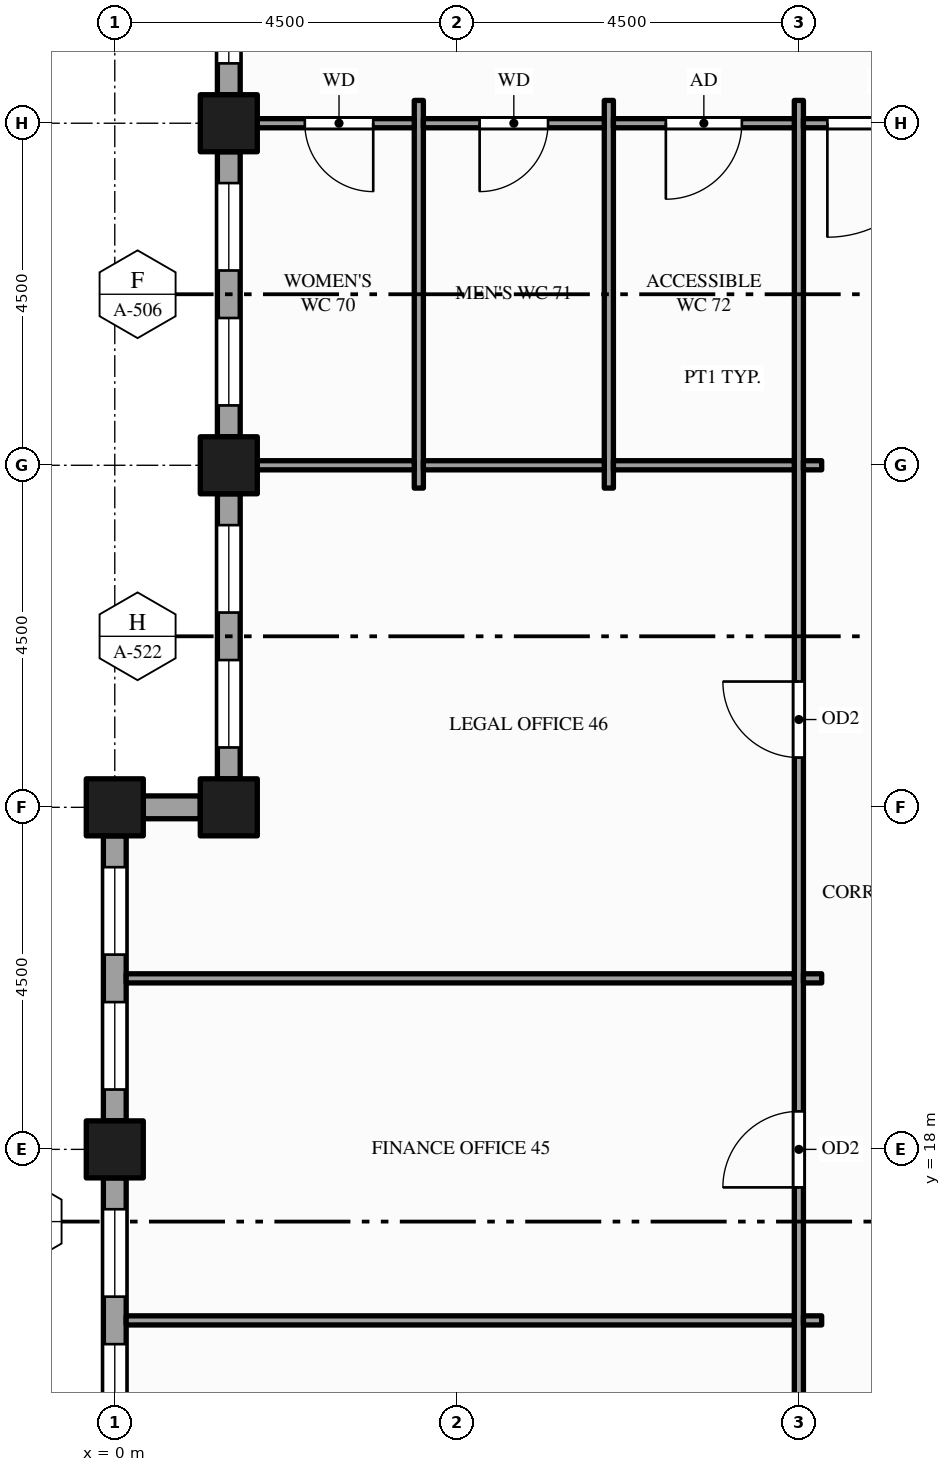
"""IFC4 building model, lengths in metres.
Left out: names, types, materials, properties, quantities, classifications, styles, units other than length and angle.
Written with IfcOpenShell. Run it as: python <this file> out.ifc"""

import sys

from ifc_helpers import new_model, si_unit, direction, frame, frame_2d, origin, origin_2d, place, context, subcontext, project, spatial, rectangle, hollow_rectangle, extrude, element, fill, save


model = new_model("IFC4")
c1 = context("Model", 3, precision=1e-05, world=origin(), true_north=direction((0.0, 1.0)))
c2 = subcontext(c1, "Body", "Model", "MODEL_VIEW")
j1 = project(units=[si_unit("LENGTHUNIT", "METRE"), si_unit("PLANEANGLEUNIT", "RADIAN")], contexts=[c1])
p1 = place(None, origin())
s1 = spatial("IfcSite", under=j1, at=p1, CompositionType="ELEMENT")
p2 = place(p1, origin())
s2 = spatial("IfcBuilding", under=s1, at=p2, CompositionType="ELEMENT")
p3 = place(p2, frame((0.0, 0.0, 195.0)))
s3 = spatial("IfcBuildingStorey", under=s2, at=p3, CompositionType="ELEMENT", Elevation=195.0)
for number, where, z_axis, x_axis in (
    (1, (0.0, 18.0, -0.15), (0.0, 0.0, 1.0), (1.0, 0.0, 0.0)),
    (2, (0.0, 22.5, -0.15), (0.0, 0.0, 1.0), (1.0, 0.0, 0.0)),
    (3, (1.5, 22.5, -0.15), (0.0, 0.0, 1.0), (1.0, 0.0, 0.0)),
    (4, (1.5, 27.0, -0.15), (0.0, 0.0, 1.0), (1.0, 0.0, 0.0)),
    (5, (1.5, 31.5, -0.15), (0.0, 0.0, 1.0), (1.0, 0.0, 0.0)),
):
    element("IfcColumn", number, at=place(p3, frame(where, z_axis=z_axis, x_axis=x_axis)), inside=s3, PredefinedType="COLUMN", context=c2, shape_type="SweptSolid", body=[
        extrude(hollow_rectangle(XDim=0.75, YDim=0.75, WallThickness=0.036, at=origin_2d()), origin(), (0.0, 0.0, 1.0), 4.0),
    ])
p4 = place(p3, frame((1.5, 36.0, 0.0), z_axis=(0.0, 0.0, 1.0), x_axis=(0.0, -1.0, 0.0)))
e6 = element("IfcWall", 6, at=p4, inside=s3, PredefinedType="STANDARD", context=c2, shape_type="SweptSolid", body=[
    extrude(rectangle(XDim=4.125, YDim=0.3, at=frame_2d((2.062, 0.0))), origin(), (0.0, 0.0, 1.0), 3.157),
])
p5 = place(p4, frame((0.4, 0.0, 0.9)))
e7 = element("IfcOpeningElement", 7, at=p5, cuts=e6, PredefinedType="OPENING", context=c2, shape_type="SweptSolid", body=[
    extrude(rectangle(XDim=1.55, YDim=2.0, at=frame_2d((0.775, 1.0))), frame((0.0, 0.16, 0.0), z_axis=(0.0, -1.0, 0.0), x_axis=(1.0, 0.0, 0.0)), (0.0, 0.0, 1.0), 0.32),
])
p6 = place(p4, frame((2.562, 0.0, 0.9)))
e8 = element("IfcOpeningElement", 8, at=p6, cuts=e6, PredefinedType="OPENING", context=c2, shape_type="SweptSolid", body=[
    extrude(rectangle(XDim=1.15, YDim=2.0, at=frame_2d((0.575, 1.0))), frame((0.0, 0.16, 0.0), z_axis=(0.0, -1.0, 0.0), x_axis=(1.0, 0.0, 0.0)), (0.0, 0.0, 1.0), 0.32),
])
p7 = place(p3, frame((1.5, 31.125, 0.0), z_axis=(0.0, 0.0, 1.0), x_axis=(0.0, -1.0, 0.0)))
e9 = element("IfcWall", 9, at=p7, inside=s3, PredefinedType="STANDARD", context=c2, shape_type="SweptSolid", body=[
    extrude(rectangle(XDim=3.75, YDim=0.3, at=frame_2d((1.875, 0.0))), origin(), (0.0, 0.0, 1.0), 3.157),
])
p8 = place(p7, frame((0.413, 0.0, 0.9)))
e10 = element("IfcOpeningElement", 10, at=p8, cuts=e9, PredefinedType="OPENING", context=c2, shape_type="SweptSolid", body=[
    extrude(rectangle(XDim=1.15, YDim=2.0, at=frame_2d((0.575, 1.0))), frame((0.0, 0.16, 0.0), z_axis=(0.0, -1.0, 0.0), x_axis=(1.0, 0.0, 0.0)), (0.0, 0.0, 1.0), 0.32),
])
p9 = place(p7, frame((2.188, 0.0, 0.9)))
e11 = element("IfcOpeningElement", 11, at=p9, cuts=e9, PredefinedType="OPENING", context=c2, shape_type="SweptSolid", body=[
    extrude(rectangle(XDim=1.15, YDim=2.0, at=frame_2d((0.575, 1.0))), frame((0.0, 0.16, 0.0), z_axis=(0.0, -1.0, 0.0), x_axis=(1.0, 0.0, 0.0)), (0.0, 0.0, 1.0), 0.32),
])
p10 = place(p3, frame((1.5, 26.625, 0.0), z_axis=(0.0, 0.0, 1.0), x_axis=(0.0, -1.0, 0.0)))
e12 = element("IfcWall", 12, at=p10, inside=s3, PredefinedType="STANDARD", context=c2, shape_type="SweptSolid", body=[
    extrude(rectangle(XDim=3.75, YDim=0.3, at=frame_2d((1.875, 0.0))), origin(), (0.0, 0.0, 1.0), 3.157),
])
p11 = place(p10, frame((0.413, 0.0, 0.9)))
e13 = element("IfcOpeningElement", 13, at=p11, cuts=e12, PredefinedType="OPENING", context=c2, shape_type="SweptSolid", body=[
    extrude(rectangle(XDim=1.15, YDim=2.0, at=frame_2d((0.575, 1.0))), frame((0.0, 0.16, 0.0), z_axis=(0.0, -1.0, 0.0), x_axis=(1.0, 0.0, 0.0)), (0.0, 0.0, 1.0), 0.32),
])
p12 = place(p10, frame((2.188, 0.0, 0.9)))
e14 = element("IfcOpeningElement", 14, at=p12, cuts=e12, PredefinedType="OPENING", context=c2, shape_type="SweptSolid", body=[
    extrude(rectangle(XDim=1.15, YDim=2.0, at=frame_2d((0.575, 1.0))), frame((0.0, 0.16, 0.0), z_axis=(0.0, -1.0, 0.0), x_axis=(1.0, 0.0, 0.0)), (0.0, 0.0, 1.0), 0.32),
])
p13 = place(p3, frame((1.125, 22.5, 0.0), z_axis=(0.0, 0.0, 1.0), x_axis=(-1.0, 0.0, 0.0)))
e15 = element("IfcWall", 15, at=p13, inside=s3, PredefinedType="STANDARD", context=c2, shape_type="SweptSolid", body=[
    extrude(rectangle(XDim=0.75, YDim=0.3, at=frame_2d((0.375, 0.0))), origin(), (0.0, 0.0, 1.0), 3.157),
])
p14 = place(p3, frame((0.0, 22.125, 0.0), z_axis=(0.0, 0.0, 1.0), x_axis=(0.0, -1.0, 0.0)))
e16 = element("IfcWall", 16, at=p14, inside=s3, PredefinedType="STANDARD", context=c2, shape_type="SweptSolid", body=[
    extrude(rectangle(XDim=3.75, YDim=0.3, at=frame_2d((1.875, 0.0))), origin(), (0.0, 0.0, 1.0), 3.157),
])
p15 = place(p14, frame((0.413, 0.0, 0.9)))
e17 = element("IfcOpeningElement", 17, at=p15, cuts=e16, PredefinedType="OPENING", context=c2, shape_type="SweptSolid", body=[
    extrude(rectangle(XDim=1.15, YDim=2.0, at=frame_2d((0.575, 1.0))), frame((0.0, 0.16, 0.0), z_axis=(0.0, -1.0, 0.0), x_axis=(1.0, 0.0, 0.0)), (0.0, 0.0, 1.0), 0.32),
])
p16 = place(p14, frame((2.188, 0.0, 0.9)))
e18 = element("IfcOpeningElement", 18, at=p16, cuts=e16, PredefinedType="OPENING", context=c2, shape_type="SweptSolid", body=[
    extrude(rectangle(XDim=1.15, YDim=2.0, at=frame_2d((0.575, 1.0))), frame((0.0, 0.16, 0.0), z_axis=(0.0, -1.0, 0.0), x_axis=(1.0, 0.0, 0.0)), (0.0, 0.0, 1.0), 0.32),
])
p17 = place(p3, frame((0.0, 17.625, 0.0), z_axis=(0.0, 0.0, 1.0), x_axis=(0.0, -1.0, 0.0)))
e19 = element("IfcWall", 19, at=p17, inside=s3, PredefinedType="STANDARD", context=c2, shape_type="SweptSolid", body=[
    extrude(rectangle(XDim=3.75, YDim=0.3, at=frame_2d((1.875, 0.0))), origin(), (0.0, 0.0, 1.0), 3.157),
])
p18 = place(p17, frame((0.413, 0.0, 0.9)))
e20 = element("IfcOpeningElement", 20, at=p18, cuts=e19, PredefinedType="OPENING", context=c2, shape_type="SweptSolid", body=[
    extrude(rectangle(XDim=1.15, YDim=2.0, at=frame_2d((0.575, 1.0))), frame((0.0, 0.16, 0.0), z_axis=(0.0, -1.0, 0.0), x_axis=(1.0, 0.0, 0.0)), (0.0, 0.0, 1.0), 0.32),
])
p19 = place(p17, frame((2.188, 0.0, 0.9)))
e21 = element("IfcOpeningElement", 21, at=p19, cuts=e19, PredefinedType="OPENING", context=c2, shape_type="SweptSolid", body=[
    extrude(rectangle(XDim=1.15, YDim=2.0, at=frame_2d((0.575, 1.0))), frame((0.0, 0.16, 0.0), z_axis=(0.0, -1.0, 0.0), x_axis=(1.0, 0.0, 0.0)), (0.0, 0.0, 1.0), 0.32),
])
for number, where, z_axis, x_axis in (
    (22, (4.0, 26.7, 0.0), (0.0, 0.0, 1.0), (0.0, 1.0, 0.0)),
    (23, (6.5, 26.7, 0.0), (0.0, 0.0, 1.0), (0.0, 1.0, 0.0)),
):
    element("IfcWall", number, at=place(p3, frame(where, z_axis=z_axis, x_axis=x_axis)), inside=s3, PredefinedType="PARTITIONING", context=c2, shape_type="SweptSolid", body=[
        extrude(rectangle(XDim=5.1, YDim=0.12, at=frame_2d((2.55, 0.0))), origin(), (0.0, 0.0, 1.0), 3.85),
    ])
p20 = place(p3, frame((9.0, 10.95, 0.0), z_axis=(0.0, 0.0, 1.0), x_axis=(0.0, 1.0, 0.0)))
e24 = element("IfcWall", 24, at=p20, inside=s3, PredefinedType="PARTITIONING", context=c2, shape_type="SweptSolid", body=[
    extrude(rectangle(XDim=20.85, YDim=0.12, at=frame_2d((10.425, 0.0))), origin(), (0.0, 0.0, 1.0), 2.6),
])
p21 = place(p20, frame((2.05, 0.0, 0.0)))
e25 = element("IfcOpeningElement", 25, at=p21, cuts=e24, PredefinedType="OPENING", context=c2, shape_type="SweptSolid", body=[
    extrude(rectangle(XDim=1.0, YDim=2.1, at=frame_2d((0.5, 1.05))), frame((0.0, 0.07, 0.0), z_axis=(0.0, -1.0, 0.0), x_axis=(1.0, 0.0, 0.0)), (0.0, 0.0, 1.0), 0.14),
])
p22 = place(p20, frame((6.55, 0.0, 0.0)))
e26 = element("IfcOpeningElement", 26, at=p22, cuts=e24, PredefinedType="OPENING", context=c2, shape_type="SweptSolid", body=[
    extrude(rectangle(XDim=1.0, YDim=2.1, at=frame_2d((0.5, 1.05))), frame((0.0, 0.07, 0.0), z_axis=(0.0, -1.0, 0.0), x_axis=(1.0, 0.0, 0.0)), (0.0, 0.0, 1.0), 0.14),
])
p23 = place(p20, frame((12.205, 0.0, 0.0)))
e27 = element("IfcOpeningElement", 27, at=p23, cuts=e24, PredefinedType="OPENING", context=c2, shape_type="SweptSolid", body=[
    extrude(rectangle(XDim=1.0, YDim=2.1, at=frame_2d((0.5, 1.05))), frame((0.0, 0.07, 0.0), z_axis=(0.0, -1.0, 0.0), x_axis=(1.0, 0.0, 0.0)), (0.0, 0.0, 1.0), 0.14),
])
p24 = place(p3, frame((0.15, 15.75, 0.0), z_axis=(0.0, 0.0, 1.0), x_axis=(1.0, 0.0, 0.0)))
e28 = element("IfcWall", 28, at=p24, inside=s3, PredefinedType="PARTITIONING", context=c2, shape_type="SweptSolid", body=[
    extrude(rectangle(XDim=8.79, YDim=0.12, at=frame_2d((4.395, 0.0))), origin(), (0.0, 0.0, 1.0), 2.87),
])
p25 = place(p3, frame((9.06, 15.75, 0.0), z_axis=(0.0, 0.0, 1.0), x_axis=(1.0, 0.0, 0.0)))
e29 = element("IfcWall", 29, at=p25, inside=s3, PredefinedType="PARTITIONING", context=c2, shape_type="SweptSolid", body=[
    extrude(rectangle(XDim=0.24, YDim=0.12, at=frame_2d((0.12, 0.0))), origin(), (0.0, 0.0, 1.0), 2.87),
])
p26 = place(p3, frame((0.15, 20.25, 0.0), z_axis=(0.0, 0.0, 1.0), x_axis=(1.0, 0.0, 0.0)))
e30 = element("IfcWall", 30, at=p26, inside=s3, PredefinedType="PARTITIONING", context=c2, shape_type="SweptSolid", body=[
    extrude(rectangle(XDim=8.79, YDim=0.12, at=frame_2d((4.395, 0.0))), origin(), (0.0, 0.0, 1.0), 2.87),
])
p27 = place(p3, frame((9.06, 20.25, 0.0), z_axis=(0.0, 0.0, 1.0), x_axis=(1.0, 0.0, 0.0)))
e31 = element("IfcWall", 31, at=p27, inside=s3, PredefinedType="PARTITIONING", context=c2, shape_type="SweptSolid", body=[
    extrude(rectangle(XDim=0.24, YDim=0.12, at=frame_2d((0.12, 0.0))), origin(), (0.0, 0.0, 1.0), 2.87),
])
p28 = place(p3, frame((1.65, 27.0, 0.0), z_axis=(0.0, 0.0, 1.0), x_axis=(1.0, 0.0, 0.0)))
e32 = element("IfcWall", 32, at=p28, inside=s3, PredefinedType="PARTITIONING", context=c2, shape_type="SweptSolid", body=[
    extrude(rectangle(XDim=2.29, YDim=0.12, at=frame_2d((1.145, 0.0))), origin(), (0.0, 0.0, 1.0), 2.87),
])
for number, where, z_axis, x_axis in (
    (33, (4.06, 27.0, 0.0), (0.0, 0.0, 1.0), (1.0, 0.0, 0.0)),
    (34, (6.56, 27.0, 0.0), (0.0, 0.0, 1.0), (1.0, 0.0, 0.0)),
):
    element("IfcWall", number, at=place(p3, frame(where, z_axis=z_axis, x_axis=x_axis)), inside=s3, PredefinedType="PARTITIONING", context=c2, shape_type="SweptSolid", body=[
        extrude(rectangle(XDim=2.38, YDim=0.12, at=frame_2d((1.19, 0.0))), origin(), (0.0, 0.0, 1.0), 2.87),
    ])
p29 = place(p3, frame((9.06, 27.0, 0.0), z_axis=(0.0, 0.0, 1.0), x_axis=(1.0, 0.0, 0.0)))
e35 = element("IfcWall", 35, at=p29, inside=s3, PredefinedType="PARTITIONING", context=c2, shape_type="SweptSolid", body=[
    extrude(rectangle(XDim=0.24, YDim=0.12, at=frame_2d((0.12, 0.0))), origin(), (0.0, 0.0, 1.0), 2.87),
])
p30 = place(p3, frame((1.65, 31.5, 0.0), z_axis=(0.0, 0.0, 1.0), x_axis=(1.0, 0.0, 0.0)))
e36 = element("IfcWall", 36, at=p30, inside=s3, PredefinedType="PARTITIONING", context=c2, shape_type="SweptSolid", body=[
    extrude(rectangle(XDim=2.29, YDim=0.12, at=frame_2d((1.145, 0.0))), origin(), (0.0, 0.0, 1.0), 2.87),
])
p31 = place(p30, frame((0.85, 0.0, 0.0)))
e37 = element("IfcOpeningElement", 37, at=p31, cuts=e36, PredefinedType="OPENING", context=c2, shape_type="SweptSolid", body=[
    extrude(rectangle(XDim=0.9, YDim=2.1, at=frame_2d((0.45, 1.05))), frame((0.0, 0.07, 0.0), z_axis=(0.0, -1.0, 0.0), x_axis=(1.0, 0.0, 0.0)), (0.0, 0.0, 1.0), 0.14),
])
p32 = place(p3, frame((4.06, 31.5, 0.0), z_axis=(0.0, 0.0, 1.0), x_axis=(1.0, 0.0, 0.0)))
e38 = element("IfcWall", 38, at=p32, inside=s3, PredefinedType="PARTITIONING", context=c2, shape_type="SweptSolid", body=[
    extrude(rectangle(XDim=2.38, YDim=0.12, at=frame_2d((1.19, 0.0))), origin(), (0.0, 0.0, 1.0), 2.87),
])
p33 = place(p32, frame((0.74, 0.0, 0.0)))
e39 = element("IfcOpeningElement", 39, at=p33, cuts=e38, PredefinedType="OPENING", context=c2, shape_type="SweptSolid", body=[
    extrude(rectangle(XDim=0.9, YDim=2.1, at=frame_2d((0.45, 1.05))), frame((0.0, 0.07, 0.0), z_axis=(0.0, -1.0, 0.0), x_axis=(1.0, 0.0, 0.0)), (0.0, 0.0, 1.0), 0.14),
])
p34 = place(p3, frame((6.56, 31.5, 0.0), z_axis=(0.0, 0.0, 1.0), x_axis=(1.0, 0.0, 0.0)))
e40 = element("IfcWall", 40, at=p34, inside=s3, PredefinedType="PARTITIONING", context=c2, shape_type="SweptSolid", body=[
    extrude(rectangle(XDim=2.38, YDim=0.12, at=frame_2d((1.19, 0.0))), origin(), (0.0, 0.0, 1.0), 2.87),
])
p35 = place(p34, frame((0.69, 0.0, 0.0)))
e41 = element("IfcOpeningElement", 41, at=p35, cuts=e40, PredefinedType="OPENING", context=c2, shape_type="SweptSolid", body=[
    extrude(rectangle(XDim=1.0, YDim=2.1, at=frame_2d((0.5, 1.05))), frame((0.0, 0.07, 0.0), z_axis=(0.0, -1.0, 0.0), x_axis=(1.0, 0.0, 0.0)), (0.0, 0.0, 1.0), 0.14),
])
p36 = place(p3, frame((9.06, 31.5, 0.0), z_axis=(0.0, 0.0, 1.0), x_axis=(1.0, 0.0, 0.0)))
e42 = element("IfcWall", 42, at=p36, inside=s3, PredefinedType="PARTITIONING", context=c2, shape_type="SweptSolid", body=[
    extrude(rectangle(XDim=2.13, YDim=0.12, at=frame_2d((1.065, 0.0))), origin(), (0.0, 0.0, 1.0), 2.87),
])
p37 = place(p36, frame((0.315, 0.0, 0.0)))
e43 = element("IfcOpeningElement", 43, at=p37, cuts=e42, PredefinedType="OPENING", context=c2, shape_type="SweptSolid", body=[
    extrude(rectangle(XDim=1.5, YDim=2.1, at=frame_2d((0.75, 1.05))), frame((0.0, 0.07, 0.0), z_axis=(0.0, -1.0, 0.0), x_axis=(1.0, 0.0, 0.0)), (0.0, 0.0, 1.0), 0.14),
])
p38 = place(p6, origin())
e44 = element("IfcWindow", 44, at=p38, inside=s3, PartitioningType="SINGLE_PANEL", PredefinedType="WINDOW", context=c2, shape_type="SweptSolid", body=[
    extrude(rectangle(XDim=1.15, YDim=2.0, at=frame_2d((0.575, 1.0))), frame((0.0, 0.03, 0.0), z_axis=(0.0, -1.0, 0.0), x_axis=(1.0, 0.0, 0.0)), (0.0, 0.0, 1.0), 0.06),
])
fill(e8, e44)
p39 = place(p8, origin())
e45 = element("IfcWindow", 45, at=p39, inside=s3, PartitioningType="SINGLE_PANEL", PredefinedType="WINDOW", context=c2, shape_type="SweptSolid", body=[
    extrude(rectangle(XDim=1.15, YDim=2.0, at=frame_2d((0.575, 1.0))), frame((0.0, 0.03, 0.0), z_axis=(0.0, -1.0, 0.0), x_axis=(1.0, 0.0, 0.0)), (0.0, 0.0, 1.0), 0.06),
])
fill(e10, e45)
p40 = place(p9, origin())
e46 = element("IfcWindow", 46, at=p40, inside=s3, PartitioningType="SINGLE_PANEL", PredefinedType="WINDOW", context=c2, shape_type="SweptSolid", body=[
    extrude(rectangle(XDim=1.15, YDim=2.0, at=frame_2d((0.575, 1.0))), frame((0.0, 0.03, 0.0), z_axis=(0.0, -1.0, 0.0), x_axis=(1.0, 0.0, 0.0)), (0.0, 0.0, 1.0), 0.06),
])
fill(e11, e46)
p41 = place(p11, origin())
e47 = element("IfcWindow", 47, at=p41, inside=s3, PartitioningType="SINGLE_PANEL", PredefinedType="WINDOW", context=c2, shape_type="SweptSolid", body=[
    extrude(rectangle(XDim=1.15, YDim=2.0, at=frame_2d((0.575, 1.0))), frame((0.0, 0.03, 0.0), z_axis=(0.0, -1.0, 0.0), x_axis=(1.0, 0.0, 0.0)), (0.0, 0.0, 1.0), 0.06),
])
fill(e13, e47)
p42 = place(p12, origin())
e48 = element("IfcWindow", 48, at=p42, inside=s3, PartitioningType="SINGLE_PANEL", PredefinedType="WINDOW", context=c2, shape_type="SweptSolid", body=[
    extrude(rectangle(XDim=1.15, YDim=2.0, at=frame_2d((0.575, 1.0))), frame((0.0, 0.03, 0.0), z_axis=(0.0, -1.0, 0.0), x_axis=(1.0, 0.0, 0.0)), (0.0, 0.0, 1.0), 0.06),
])
fill(e14, e48)
p43 = place(p15, origin())
e49 = element("IfcWindow", 49, at=p43, inside=s3, PartitioningType="SINGLE_PANEL", PredefinedType="WINDOW", context=c2, shape_type="SweptSolid", body=[
    extrude(rectangle(XDim=1.15, YDim=2.0, at=frame_2d((0.575, 1.0))), frame((0.0, 0.03, 0.0), z_axis=(0.0, -1.0, 0.0), x_axis=(1.0, 0.0, 0.0)), (0.0, 0.0, 1.0), 0.06),
])
fill(e17, e49)
p44 = place(p16, origin())
e50 = element("IfcWindow", 50, at=p44, inside=s3, PartitioningType="SINGLE_PANEL", PredefinedType="WINDOW", context=c2, shape_type="SweptSolid", body=[
    extrude(rectangle(XDim=1.15, YDim=2.0, at=frame_2d((0.575, 1.0))), frame((0.0, 0.03, 0.0), z_axis=(0.0, -1.0, 0.0), x_axis=(1.0, 0.0, 0.0)), (0.0, 0.0, 1.0), 0.06),
])
fill(e18, e50)
p45 = place(p18, origin())
e51 = element("IfcWindow", 51, at=p45, inside=s3, PartitioningType="SINGLE_PANEL", PredefinedType="WINDOW", context=c2, shape_type="SweptSolid", body=[
    extrude(rectangle(XDim=1.15, YDim=2.0, at=frame_2d((0.575, 1.0))), frame((0.0, 0.03, 0.0), z_axis=(0.0, -1.0, 0.0), x_axis=(1.0, 0.0, 0.0)), (0.0, 0.0, 1.0), 0.06),
])
fill(e20, e51)
p46 = place(p19, origin())
e52 = element("IfcWindow", 52, at=p46, inside=s3, PartitioningType="SINGLE_PANEL", PredefinedType="WINDOW", context=c2, shape_type="SweptSolid", body=[
    extrude(rectangle(XDim=1.15, YDim=2.0, at=frame_2d((0.575, 1.0))), frame((0.0, 0.03, 0.0), z_axis=(0.0, -1.0, 0.0), x_axis=(1.0, 0.0, 0.0)), (0.0, 0.0, 1.0), 0.06),
])
fill(e21, e52)
p47 = place(p37, origin())
e53 = element("IfcDoor", 53, at=p47, inside=s3, OperationType="SINGLE_SWING_LEFT", PredefinedType="DOOR", context=c2, shape_type="SweptSolid", body=[
    extrude(rectangle(XDim=1.5, YDim=2.1, at=frame_2d((0.75, 1.05))), frame((0.0, 0.025, 0.0), z_axis=(0.0, -1.0, 0.0), x_axis=(1.0, 0.0, 0.0)), (0.0, 0.0, 1.0), 0.05),
])
fill(e43, e53)
p48 = place(p22, origin())
e54 = element("IfcDoor", 54, at=p48, inside=s3, OperationType="SINGLE_SWING_LEFT", PredefinedType="DOOR", context=c2, shape_type="SweptSolid", body=[
    extrude(rectangle(XDim=1.0, YDim=2.1, at=frame_2d((0.5, 1.05))), frame((0.0, 0.025, 0.0), z_axis=(0.0, -1.0, 0.0), x_axis=(1.0, 0.0, 0.0)), (0.0, 0.0, 1.0), 0.05),
])
fill(e26, e54)
p49 = place(p23, origin())
e55 = element("IfcDoor", 55, at=p49, inside=s3, OperationType="SINGLE_SWING_RIGHT", PredefinedType="DOOR", context=c2, shape_type="SweptSolid", body=[
    extrude(rectangle(XDim=1.0, YDim=2.1, at=frame_2d((0.5, 1.05))), frame((0.0, 0.025, 0.0), z_axis=(0.0, -1.0, 0.0), x_axis=(1.0, 0.0, 0.0)), (0.0, 0.0, 1.0), 0.05),
])
fill(e27, e55)
p50 = place(p31, origin())
e56 = element("IfcDoor", 56, at=p50, inside=s3, OperationType="SINGLE_SWING_RIGHT", PredefinedType="DOOR", context=c2, shape_type="SweptSolid", body=[
    extrude(rectangle(XDim=0.9, YDim=2.1, at=frame_2d((0.45, 1.05))), frame((0.0, 0.025, 0.0), z_axis=(0.0, -1.0, 0.0), x_axis=(1.0, 0.0, 0.0)), (0.0, 0.0, 1.0), 0.05),
])
fill(e37, e56)
p51 = place(p33, origin())
e57 = element("IfcDoor", 57, at=p51, inside=s3, OperationType="SINGLE_SWING_LEFT", PredefinedType="DOOR", context=c2, shape_type="SweptSolid", body=[
    extrude(rectangle(XDim=0.9, YDim=2.1, at=frame_2d((0.45, 1.05))), frame((0.0, 0.025, 0.0), z_axis=(0.0, -1.0, 0.0), x_axis=(1.0, 0.0, 0.0)), (0.0, 0.0, 1.0), 0.05),
])
fill(e39, e57)
p52 = place(p35, origin())
e58 = element("IfcDoor", 58, at=p52, inside=s3, OperationType="SINGLE_SWING_LEFT", PredefinedType="DOOR", context=c2, shape_type="SweptSolid", body=[
    extrude(rectangle(XDim=1.0, YDim=2.1, at=frame_2d((0.5, 1.05))), frame((0.0, 0.025, 0.0), z_axis=(0.0, -1.0, 0.0), x_axis=(1.0, 0.0, 0.0)), (0.0, 0.0, 1.0), 0.05),
])
fill(e41, e58)
save(model, sys.argv[1])
